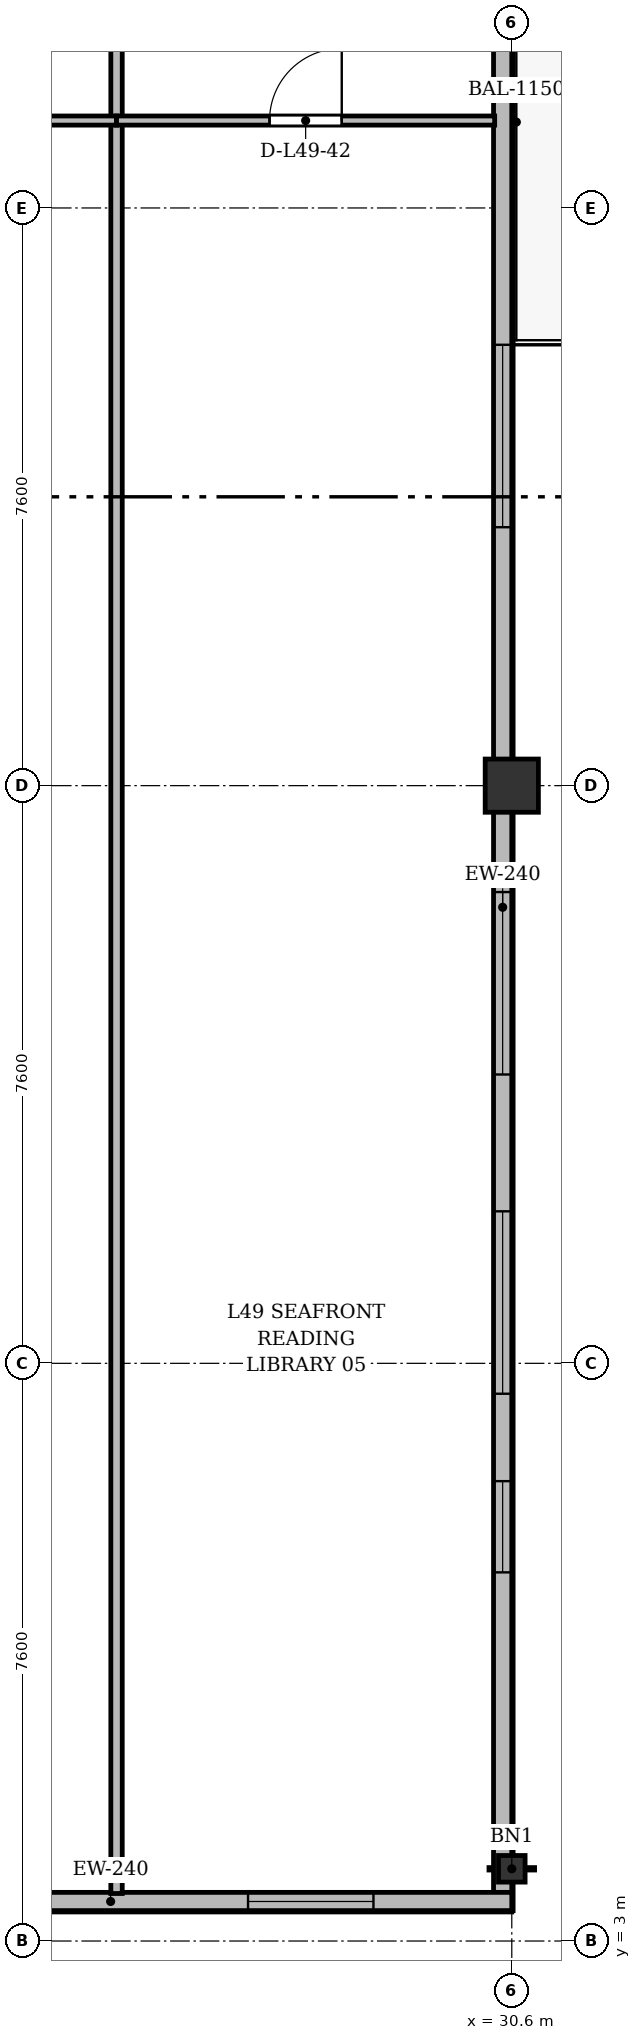
"""IFC4 building model, lengths in metres.
Left out: names, types, materials, properties, quantities, classifications, styles, units other than length and angle.
Written with IfcOpenShell. Run it as: python <this file> out.ifc"""

import sys

from ifc_helpers import new_model, si_unit, direction, frame, frame_2d, origin, origin_2d, place, context, subcontext, project, spatial, rectangle, i_section, extrude, source, transform, mapped, element, fill, save


model = new_model("IFC4")
c1 = context("Model", 3, precision=1e-05, world=origin(), true_north=direction((0.0, 1.0)))
c2 = subcontext(c1, "Body", "Model", "MODEL_VIEW")
j1 = project(units=[si_unit("LENGTHUNIT", "METRE"), si_unit("PLANEANGLEUNIT", "RADIAN")], contexts=[c1])
p1 = place(None, origin())
s1 = spatial("IfcSite", under=j1, at=p1, CompositionType="ELEMENT")
p2 = place(p1, origin())
s2 = spatial("IfcBuilding", under=s1, at=p2, CompositionType="ELEMENT")
p3 = place(p2, frame((0.0, 0.0, 190.5)))
s3 = spatial("IfcBuildingStorey", under=s2, at=p3, CompositionType="ELEMENT", Elevation=190.5)
m1 = source(origin(), c2, "Body", "SweptSolid", [
    extrude(i_section(OverallWidth=0.35, OverallDepth=0.35, WebThickness=0.018, FlangeThickness=0.028, at=origin_2d()), origin(), (0.0, 0.0, 1.0), 3.6),
])
p4 = place(p3, frame((30.6, 3.95, 0.0), z_axis=(0.0, 0.0, 1.0), x_axis=(1.0, 0.0, 0.0)))
e1 = element("IfcColumn", 1, at=p4, inside=s3, PredefinedType="COLUMN", context=c2, shape_type="MappedRepresentation", body=[
    mapped(m1, transform((0.0, 0.0, 0.0), x_axis=(1.0, 0.0, 0.0), y_axis=(0.0, 1.0, 0.0), z_axis=(0.0, 0.0, 1.0), scale=1.0)),
])
m2 = source(origin(), c2, "Body", "SweptSolid", [
    extrude(rectangle(XDim=0.7, YDim=0.7, at=origin_2d()), origin(), (0.0, 0.0, 1.0), 3.6),
])
p5 = place(p3, frame((30.6, 18.2, 0.0), z_axis=(0.0, 0.0, 1.0), x_axis=(1.0, 0.0, 0.0)))
e2 = element("IfcColumn", 2, at=p5, inside=s3, PredefinedType="COLUMN", context=c2, shape_type="MappedRepresentation", body=[
    mapped(m2, transform((0.0, 0.0, 0.0), x_axis=(1.0, 0.0, 0.0), y_axis=(0.0, 1.0, 0.0), z_axis=(0.0, 0.0, 1.0), scale=1.0)),
])
p6 = place(p3, frame((30.48, 29.8, 0.0), z_axis=(0.0, 0.0, 1.0), x_axis=(0.0, -1.0, 0.0)))
e3 = element("IfcWall", 3, at=p6, inside=s3, PredefinedType="SOLIDWALL", context=c2, shape_type="SweptSolid", body=[
    extrude(rectangle(XDim=26.4, YDim=0.24, at=frame_2d((13.2, 0.0))), origin(), (0.0, 0.0, 1.0), 2.86),
])
p7 = place(p6, frame((20.75, 0.0, 0.92)))
e4 = element("IfcOpeningElement", 4, at=p7, cuts=e3, PredefinedType="OPENING", context=c2, shape_type="SweptSolid", body=[
    extrude(rectangle(XDim=1.2, YDim=1.65, at=frame_2d((0.6, 0.825))), frame((0.0, 0.13, 0.0), z_axis=(0.0, -1.0, 0.0), x_axis=(1.0, 0.0, 0.0)), (0.0, 0.0, 1.0), 0.26),
])
p8 = place(p6, frame((17.2, 0.0, 0.92)))
e5 = element("IfcOpeningElement", 5, at=p8, cuts=e3, PredefinedType="OPENING", context=c2, shape_type="SweptSolid", body=[
    extrude(rectangle(XDim=2.4, YDim=1.84, at=frame_2d((1.2, 0.92))), frame((0.0, 0.13, 0.0), z_axis=(0.0, -1.0, 0.0), x_axis=(1.0, 0.0, 0.0)), (0.0, 0.0, 1.0), 0.26),
])
p9 = place(p6, frame((13.0, 0.0, 0.92)))
e6 = element("IfcOpeningElement", 6, at=p9, cuts=e3, PredefinedType="OPENING", context=c2, shape_type="SweptSolid", body=[
    extrude(rectangle(XDim=2.4, YDim=1.84, at=frame_2d((1.2, 0.92))), frame((0.0, 0.13, 0.0), z_axis=(0.0, -1.0, 0.0), x_axis=(1.0, 0.0, 0.0)), (0.0, 0.0, 1.0), 0.26),
])
p10 = place(p6, frame((5.8, 0.0, 0.92)))
e7 = element("IfcOpeningElement", 7, at=p10, cuts=e3, PredefinedType="OPENING", context=c2, shape_type="SweptSolid", body=[
    extrude(rectangle(XDim=2.4, YDim=1.84, at=frame_2d((1.2, 0.92))), frame((0.0, 0.13, 0.0), z_axis=(0.0, -1.0, 0.0), x_axis=(1.0, 0.0, 0.0)), (0.0, 0.0, 1.0), 0.26),
])
p11 = place(p3, frame((30.6, 3.52, 0.0), z_axis=(0.0, 0.0, 1.0), x_axis=(-1.0, 0.0, 0.0)))
e8 = element("IfcWall", 8, at=p11, inside=s3, PredefinedType="SOLIDWALL", context=c2, shape_type="SweptSolid", body=[
    extrude(rectangle(XDim=19.6, YDim=0.24, at=frame_2d((9.8, 0.0))), origin(), (0.0, 0.0, 1.0), 3.36),
])
p12 = place(p11, frame((1.82, 0.0, 0.9)))
e9 = element("IfcOpeningElement", 9, at=p12, cuts=e8, PredefinedType="OPENING", context=c2, shape_type="SweptSolid", body=[
    extrude(rectangle(XDim=1.65, YDim=1.85, at=frame_2d((0.825, 0.925))), frame((0.0, 0.13, 0.0), z_axis=(0.0, -1.0, 0.0), x_axis=(1.0, 0.0, 0.0)), (0.0, 0.0, 1.0), 0.26),
])
p13 = place(p11, frame((6.9, 0.0, 0.9)))
e10 = element("IfcOpeningElement", 10, at=p13, cuts=e8, PredefinedType="OPENING", context=c2, shape_type="SweptSolid", body=[
    extrude(rectangle(XDim=1.8, YDim=1.8, at=frame_2d((0.9, 0.9))), frame((0.0, 0.13, 0.0), z_axis=(0.0, -1.0, 0.0), x_axis=(1.0, 0.0, 0.0)), (0.0, 0.0, 1.0), 0.26),
])
p14 = place(p11, frame((10.855, 0.0, 0.0)))
e11 = element("IfcOpeningElement", 11, at=p14, cuts=e8, PredefinedType="OPENING", context=c2, shape_type="SweptSolid", body=[
    extrude(rectangle(XDim=1.2, YDim=2.2, at=frame_2d((0.6, 1.1))), frame((0.0, 0.13, 0.0), z_axis=(0.0, -1.0, 0.0), x_axis=(1.0, 0.0, 0.0)), (0.0, 0.0, 1.0), 0.26),
])
p15 = place(p11, frame((12.85, 0.0, 0.9)))
e12 = element("IfcOpeningElement", 12, at=p15, cuts=e8, PredefinedType="OPENING", context=c2, shape_type="SweptSolid", body=[
    extrude(rectangle(XDim=1.5, YDim=1.75, at=frame_2d((0.75, 0.875))), frame((0.0, 0.13, 0.0), z_axis=(0.0, -1.0, 0.0), x_axis=(1.0, 0.0, 0.0)), (0.0, 0.0, 1.0), 0.26),
])
p16 = place(p11, frame((15.0, 0.0, 0.9)))
e13 = element("IfcOpeningElement", 13, at=p16, cuts=e8, PredefinedType="OPENING", context=c2, shape_type="SweptSolid", body=[
    extrude(rectangle(XDim=2.0, YDim=1.95, at=frame_2d((1.0, 0.975))), frame((0.0, 0.13, 0.0), z_axis=(0.0, -1.0, 0.0), x_axis=(1.0, 0.0, 0.0)), (0.0, 0.0, 1.0), 0.26),
])
p17 = place(p11, frame((17.53, 0.0, 0.9)))
e14 = element("IfcOpeningElement", 14, at=p17, cuts=e8, PredefinedType="OPENING", context=c2, shape_type="SweptSolid", body=[
    extrude(rectangle(XDim=1.65, YDim=1.85, at=frame_2d((0.825, 0.925))), frame((0.0, 0.13, 0.0), z_axis=(0.0, -1.0, 0.0), x_axis=(1.0, 0.0, 0.0)), (0.0, 0.0, 1.0), 0.26),
])
p18 = place(p3, frame((25.4, 3.625, 0.0), z_axis=(0.0, 0.0, 1.0), x_axis=(0.0, 1.0, 0.0)))
e15 = element("IfcWall", 15, at=p18, inside=s3, PredefinedType="PARTITIONING", context=c2, shape_type="SweptSolid", body=[
    extrude(rectangle(XDim=27.175, YDim=0.15, at=frame_2d((13.587, 0.0))), origin(), (0.0, 0.0, 1.0), 2.91),
])
p19 = place(p3, frame((20.2, 26.95, 0.0), z_axis=(0.0, 0.0, 1.0), x_axis=(1.0, 0.0, 0.0)))
e16 = element("IfcWall", 16, at=p19, inside=s3, PredefinedType="PARTITIONING", context=c2, shape_type="SweptSolid", body=[
    extrude(rectangle(XDim=5.2, YDim=0.12, at=frame_2d((2.6, 0.0))), origin(), (0.0, 0.0, 1.0), 2.86),
])
p20 = place(p19, frame((2.033, 0.0, 0.0)))
e17 = element("IfcOpeningElement", 17, at=p20, cuts=e16, PredefinedType="OPENING", context=c2, shape_type="SweptSolid", body=[
    extrude(rectangle(XDim=0.95, YDim=2.15, at=frame_2d((0.475, 1.075))), frame((0.0, 0.07, 0.0), z_axis=(0.0, -1.0, 0.0), x_axis=(1.0, 0.0, 0.0)), (0.0, 0.0, 1.0), 0.14),
])
p21 = place(p3, frame((25.4, 26.95, 0.0), z_axis=(0.0, 0.0, 1.0), x_axis=(1.0, 0.0, 0.0)))
e18 = element("IfcWall", 18, at=p21, inside=s3, PredefinedType="PARTITIONING", context=c2, shape_type="SweptSolid", body=[
    extrude(rectangle(XDim=4.975, YDim=0.12, at=frame_2d((2.488, 0.0))), origin(), (0.0, 0.0, 1.0), 3.36),
])
p22 = place(p21, frame((2.013, 0.0, 0.0)))
e19 = element("IfcOpeningElement", 19, at=p22, cuts=e18, PredefinedType="OPENING", context=c2, shape_type="SweptSolid", body=[
    extrude(rectangle(XDim=0.95, YDim=2.15, at=frame_2d((0.475, 1.075))), frame((0.0, 0.07, 0.0), z_axis=(0.0, -1.0, 0.0), x_axis=(1.0, 0.0, 0.0)), (0.0, 0.0, 1.0), 0.14),
])
m3 = source(origin(), c2, "Body", "SweptSolid", [
    extrude(rectangle(XDim=1.2, YDim=1.65, at=frame_2d((0.6, 0.825))), frame((0.0, 0.03, 0.0), z_axis=(0.0, -1.0, 0.0), x_axis=(1.0, 0.0, 0.0)), (0.0, 0.0, 1.0), 0.06),
])
p23 = place(p7, origin())
e20 = element("IfcWindow", 20, at=p23, inside=s3, PartitioningType="SINGLE_PANEL", PredefinedType="WINDOW", context=c2, shape_type="MappedRepresentation", body=[
    mapped(m3, transform((0.0, 0.0, 0.0), x_axis=(1.0, 0.0, 0.0), y_axis=(0.0, 1.0, 0.0), z_axis=(0.0, 0.0, 1.0), scale=1.0)),
])
fill(e4, e20)
m4 = source(origin(), c2, "Body", "SweptSolid", [
    extrude(rectangle(XDim=2.4, YDim=1.84, at=frame_2d((1.2, 0.92))), frame((0.0, 0.03, 0.0), z_axis=(0.0, -1.0, 0.0), x_axis=(1.0, 0.0, 0.0)), (0.0, 0.0, 1.0), 0.06),
])
p24 = place(p8, origin())
e21 = element("IfcWindow", 21, at=p24, inside=s3, PartitioningType="SINGLE_PANEL", PredefinedType="WINDOW", context=c2, shape_type="MappedRepresentation", body=[
    mapped(m4, transform((0.0, 0.0, 0.0), x_axis=(1.0, 0.0, 0.0), y_axis=(0.0, 1.0, 0.0), z_axis=(0.0, 0.0, 1.0), scale=1.0)),
])
fill(e5, e21)
p25 = place(p9, origin())
e22 = element("IfcWindow", 22, at=p25, inside=s3, PartitioningType="SINGLE_PANEL", PredefinedType="WINDOW", context=c2, shape_type="MappedRepresentation", body=[
    mapped(m4, transform((0.0, 0.0, 0.0), x_axis=(1.0, 0.0, 0.0), y_axis=(0.0, 1.0, 0.0), z_axis=(0.0, 0.0, 1.0), scale=1.0)),
])
fill(e6, e22)
p26 = place(p10, origin())
e23 = element("IfcWindow", 23, at=p26, inside=s3, PartitioningType="SINGLE_PANEL", PredefinedType="WINDOW", context=c2, shape_type="MappedRepresentation", body=[
    mapped(m4, transform((0.0, 0.0, 0.0), x_axis=(1.0, 0.0, 0.0), y_axis=(0.0, 1.0, 0.0), z_axis=(0.0, 0.0, 1.0), scale=1.0)),
])
fill(e7, e23)
m5 = source(origin(), c2, "Body", "SweptSolid", [
    extrude(rectangle(XDim=1.65, YDim=1.85, at=frame_2d((0.825, 0.925))), frame((0.0, 0.03, 0.0), z_axis=(0.0, -1.0, 0.0), x_axis=(1.0, 0.0, 0.0)), (0.0, 0.0, 1.0), 0.06),
])
p27 = place(p12, origin())
e24 = element("IfcWindow", 24, at=p27, inside=s3, PartitioningType="SINGLE_PANEL", PredefinedType="WINDOW", context=c2, shape_type="MappedRepresentation", body=[
    mapped(m5, transform((0.0, 0.0, 0.0), x_axis=(1.0, 0.0, 0.0), y_axis=(0.0, 1.0, 0.0), z_axis=(0.0, 0.0, 1.0), scale=1.0)),
])
fill(e9, e24)
m6 = source(origin(), c2, "Body", "SweptSolid", [
    extrude(rectangle(XDim=0.95, YDim=2.15, at=frame_2d((0.475, 1.075))), frame((0.0, 0.025, 0.0), z_axis=(0.0, -1.0, 0.0), x_axis=(1.0, 0.0, 0.0)), (0.0, 0.0, 1.0), 0.05),
])
p28 = place(p22, origin())
e25 = element("IfcDoor", 25, at=p28, inside=s3, OperationType="SINGLE_SWING_RIGHT", PredefinedType="DOOR", context=c2, shape_type="MappedRepresentation", body=[
    mapped(m6, transform((0.0, 0.0, 0.0), x_axis=(1.0, 0.0, 0.0), y_axis=(0.0, 1.0, 0.0), z_axis=(0.0, 0.0, 1.0), scale=1.0)),
])
fill(e19, e25)
save(model, sys.argv[1])
